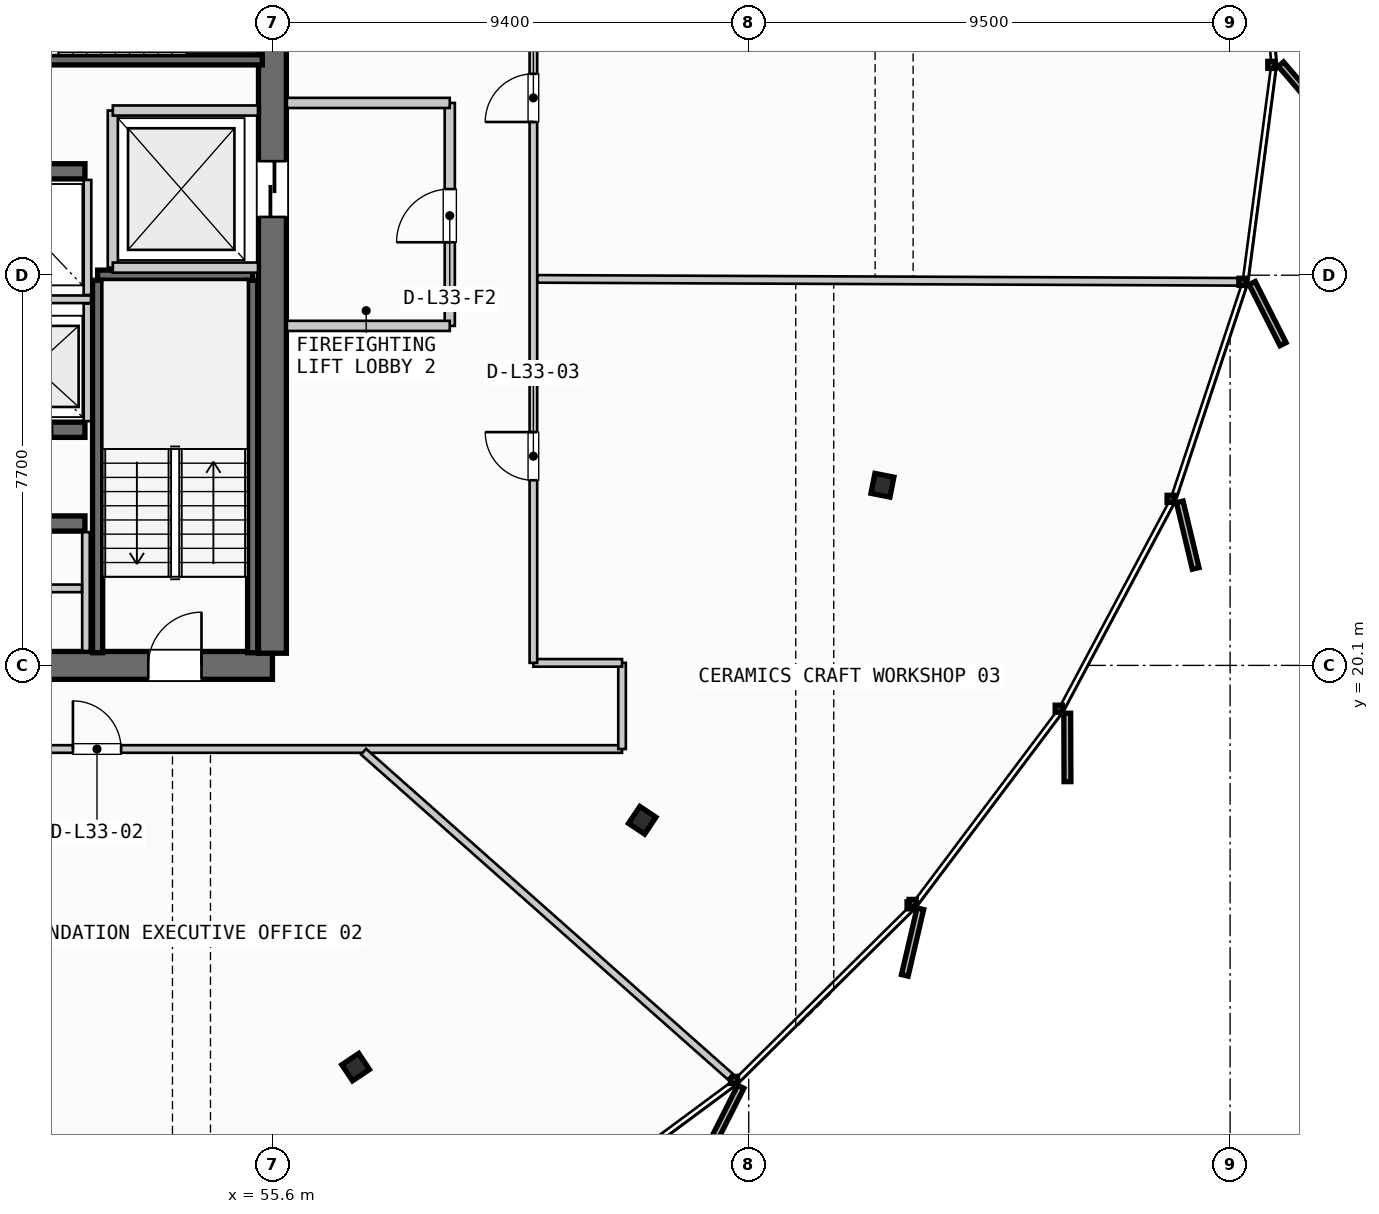
"""IFC4 building model, lengths in metres.
Left out: names, types, materials, properties, quantities, classifications, styles, units other than length and angle.
Written with IfcOpenShell. Run it as: python <this file> out.ifc"""

import sys

from ifc_helpers import new_model, si_unit, direction, frame, frame_2d, origin, origin_2d, place, context, subcontext, project, spatial, rectangle, i_section, extrude, source, transform, mapped, element, fill, save


model = new_model("IFC4")
c1 = context("Model", 3, precision=1e-05, world=origin(), true_north=direction((0.0, 1.0)))
c2 = subcontext(c1, "Body", "Model", "MODEL_VIEW")
j1 = project(units=[si_unit("LENGTHUNIT", "METRE"), si_unit("PLANEANGLEUNIT", "RADIAN")], contexts=[c1])
p1 = place(None, origin())
s1 = spatial("IfcSite", under=j1, at=p1, CompositionType="ELEMENT")
p2 = place(p1, origin())
s2 = spatial("IfcBuilding", under=s1, at=p2, CompositionType="ELEMENT")
p3 = place(p2, frame((0.0, 0.0, 132.35)))
s3 = spatial("IfcBuildingStorey", under=s2, at=p3, CompositionType="ELEMENT", Elevation=132.35)
p4 = place(p3, frame((38.0, 20.1, 0.0), z_axis=(0.0, 0.0, 1.0), x_axis=(1.0, 0.0, 0.0)))
e1 = element("IfcWall", 1, at=p4, inside=s3, PredefinedType="SHEAR", context=c2, shape_type="SweptSolid", body=[
    extrude(rectangle(XDim=17.6, YDim=0.55, at=frame_2d((8.8, 0.0))), origin(), (0.0, 0.0, 1.0), 3.3),
])
p5 = place(p4, frame((1.4, 0.0, 0.0)))
e2 = element("IfcOpeningElement", 2, at=p5, cuts=e1, PredefinedType="OPENING", context=c2, shape_type="SweptSolid", body=[
    extrude(rectangle(XDim=1.05, YDim=2.15, at=frame_2d((0.525, 1.075))), frame((0.0, 0.285, 0.0), z_axis=(0.0, -1.0, 0.0), x_axis=(1.0, 0.0, 0.0)), (0.0, 0.0, 1.0), 0.57),
])
p6 = place(p4, frame((15.15, 0.0, 0.0)))
e3 = element("IfcOpeningElement", 3, at=p6, cuts=e1, PredefinedType="OPENING", context=c2, shape_type="SweptSolid", body=[
    extrude(rectangle(XDim=1.05, YDim=2.15, at=frame_2d((0.525, 1.075))), frame((0.0, 0.285, 0.0), z_axis=(0.0, -1.0, 0.0), x_axis=(1.0, 0.0, 0.0)), (0.0, 0.0, 1.0), 0.57),
])
p7 = place(p4, frame((5.25, 0.0, 0.0)))
e4 = element("IfcOpeningElement", 4, at=p7, cuts=e1, PredefinedType="OPENING", context=c2, shape_type="SweptSolid", body=[
    extrude(rectangle(XDim=0.9, YDim=2.15, at=frame_2d((0.45, 1.075))), frame((0.0, 0.285, 0.0), z_axis=(0.0, -1.0, 0.0), x_axis=(1.0, 0.0, 0.0)), (0.0, 0.0, 1.0), 0.57),
])
p8 = place(p4, frame((11.4, 0.0, 0.0)))
e5 = element("IfcOpeningElement", 5, at=p8, cuts=e1, PredefinedType="OPENING", context=c2, shape_type="SweptSolid", body=[
    extrude(rectangle(XDim=0.95, YDim=2.15, at=frame_2d((0.475, 1.075))), frame((0.0, 0.285, 0.0), z_axis=(0.0, -1.0, 0.0), x_axis=(1.0, 0.0, 0.0)), (0.0, 0.0, 1.0), 0.57),
])
p9 = place(p3, frame((55.6, 20.34, 0.0), z_axis=(0.0, 0.0, 1.0), x_axis=(0.0, 1.0, 0.0)))
e6 = element("IfcWall", 6, at=p9, inside=s3, PredefinedType="SHEAR", context=c2, shape_type="SweptSolid", body=[
    extrude(rectangle(XDim=14.92, YDim=0.55, at=frame_2d((7.46, 0.0))), origin(), (0.0, 0.0, 1.0), 3.3),
])
p10 = place(p9, frame((12.71, 0.0, 0.0)))
e7 = element("IfcOpeningElement", 7, at=p10, cuts=e6, PredefinedType="OPENING", context=c2, shape_type="SweptSolid", body=[
    extrude(rectangle(XDim=1.05, YDim=2.15, at=frame_2d((0.525, 1.075))), frame((0.0, 0.285, 0.0), z_axis=(0.0, -1.0, 0.0), x_axis=(1.0, 0.0, 0.0)), (0.0, 0.0, 1.0), 0.57),
])
p11 = place(p9, frame((8.61, 0.0, 0.0)))
e8 = element("IfcOpeningElement", 8, at=p11, cuts=e6, PredefinedType="OPENING", context=c2, shape_type="SweptSolid", body=[
    extrude(rectangle(XDim=1.1, YDim=2.2, at=frame_2d((0.55, 1.1))), frame((0.0, 0.285, 0.0), z_axis=(0.0, -1.0, 0.0), x_axis=(1.0, 0.0, 0.0)), (0.0, 0.0, 1.0), 0.57),
])
p12 = place(p3, frame((47.65, 22.9, 0.0), z_axis=(0.0, 0.0, 1.0), x_axis=(1.0, 0.0, 0.0)))
e9 = element("IfcWall", 9, at=p12, inside=s3, PredefinedType="SHEAR", context=c2, shape_type="SweptSolid", body=[
    extrude(rectangle(XDim=4.25, YDim=0.3, at=frame_2d((2.125, 0.0))), origin(), (0.0, 0.0, 1.0), 3.3),
])
p13 = place(p3, frame((47.65, 24.75, 0.0), z_axis=(0.0, 0.0, 1.0), x_axis=(1.0, 0.0, 0.0)))
e10 = element("IfcWall", 10, at=p13, inside=s3, PredefinedType="SHEAR", context=c2, shape_type="SweptSolid", body=[
    extrude(rectangle(XDim=4.25, YDim=0.3, at=frame_2d((2.125, 0.0))), origin(), (0.0, 0.0, 1.0), 3.3),
])
p14 = place(p13, frame((0.45, 0.0, 0.0)))
e11 = element("IfcOpeningElement", 11, at=p14, cuts=e10, PredefinedType="OPENING", context=c2, shape_type="SweptSolid", body=[
    extrude(rectangle(XDim=1.1, YDim=2.2, at=frame_2d((0.55, 1.1))), frame((0.0, 0.16, 0.0), z_axis=(0.0, -1.0, 0.0), x_axis=(1.0, 0.0, 0.0)), (0.0, 0.0, 1.0), 0.32),
])
p15 = place(p13, frame((2.5, 0.0, 0.0)))
e12 = element("IfcOpeningElement", 12, at=p15, cuts=e10, PredefinedType="OPENING", context=c2, shape_type="SweptSolid", body=[
    extrude(rectangle(XDim=1.1, YDim=2.2, at=frame_2d((0.55, 1.1))), frame((0.0, 0.16, 0.0), z_axis=(0.0, -1.0, 0.0), x_axis=(1.0, 0.0, 0.0)), (0.0, 0.0, 1.0), 0.32),
])
p16 = place(p3, frame((47.65, 29.85, 0.0), z_axis=(0.0, 0.0, 1.0), x_axis=(1.0, 0.0, 0.0)))
e13 = element("IfcWall", 13, at=p16, inside=s3, PredefinedType="SHEAR", context=c2, shape_type="SweptSolid", body=[
    extrude(rectangle(XDim=4.25, YDim=0.3, at=frame_2d((2.125, 0.0))), origin(), (0.0, 0.0, 1.0), 3.3),
])
m1 = source(origin(), c2, "Body", "SweptSolid", [
    extrude(i_section(OverallWidth=0.401, OverallDepth=0.381, WebThickness=0.032, FlangeThickness=0.051, FilletRadius=0.015, at=origin_2d()), origin(), (0.0, 0.0, 1.0), 3.3),
])
for number, where, z_axis, x_axis in (
    (14, (57.242, 12.172, 0.0), (0.0, 0.0, 1.0), (0.556, -0.831, 0.0)),
    (15, (62.899, 17.043, 0.0), (0.0, 0.0, 1.0), (0.831, -0.556, 0.0)),
    (16, (67.639, 23.655, 0.0), (0.0, 0.0, 1.0), (0.981, -0.195, 0.0)),
):
    element("IfcColumn", number, at=place(p3, frame(where, z_axis=z_axis, x_axis=x_axis)), inside=s3, PredefinedType="COLUMN", context=c2, shape_type="MappedRepresentation", body=[
        mapped(m1, transform((0.0, 0.0, 0.0), scale=1.0)),
    ])
p17 = place(p3, frame((52.15, 27.8, 0.0), z_axis=(0.0, 0.0, 1.0), x_axis=(1.0, 0.0, 0.0)))
e17 = element("IfcWall", 17, at=p17, inside=s3, PredefinedType="SHEAR", context=c2, shape_type="SweptSolid", body=[
    extrude(rectangle(XDim=3.06, YDim=0.2, at=frame_2d((1.53, 0.0))), origin(), (0.0, 0.0, 1.0), 3.3),
])
for number, where, z_axis, x_axis in (
    (18, (55.21, 27.7, 0.0), (0.0, 0.0, 1.0), (0.0, -1.0, 0.0)),
    (19, (52.15, 20.35, 0.0), (0.0, 0.0, 1.0), (0.0, 1.0, 0.0)),
    (20, (55.4, 32.05, 0.0), (0.0, 0.0, 1.0), (-1.0, 0.0, 0.0)),
):
    element("IfcWall", number, at=place(p3, frame(where, z_axis=z_axis, x_axis=x_axis)), inside=s3, PredefinedType="SHEAR", context=c2, shape_type="SweptSolid", body=[
        extrude(rectangle(XDim=7.35, YDim=0.2, at=frame_2d((3.675, 0.0))), origin(), (0.0, 0.0, 1.0), 3.3),
    ])
p18 = place(p3, frame((52.45, 27.95, 0.0), z_axis=(0.0, 0.0, 1.0), x_axis=(0.0, 1.0, 0.0)))
e21 = element("IfcWall", 21, at=p18, inside=s3, PredefinedType="PARTITIONING", context=c2, shape_type="SweptSolid", body=[
    extrude(rectangle(XDim=3.1, YDim=0.2, at=frame_2d((1.55, 0.0))), origin(), (0.0, 0.0, 1.0), 2.445),
])
for number, where, z_axis, x_axis in (
    (22, (52.45, 27.95, 0.0), (0.0, 0.0, 1.0), (1.0, 0.0, 0.0)),
    (23, (52.45, 31.05, 0.0), (0.0, 0.0, 1.0), (1.0, 0.0, 0.0)),
):
    element("IfcWall", number, at=place(p3, frame(where, z_axis=z_axis, x_axis=x_axis)), inside=s3, PredefinedType="PARTITIONING", context=c2, shape_type="SweptSolid", body=[
        extrude(rectangle(XDim=2.865, YDim=0.2, at=frame_2d((1.433, 0.0))), origin(), (0.0, 0.0, 1.0), 2.445),
    ])
p19 = place(p3, frame((59.1, 26.8, 0.0), z_axis=(0.0, 0.0, 1.0), x_axis=(0.0, 1.0, 0.0)))
e24 = element("IfcWall", 24, at=p19, inside=s3, PredefinedType="PARTITIONING", context=c2, shape_type="SweptSolid", body=[
    extrude(rectangle(XDim=4.4, YDim=0.2, at=frame_2d((2.2, 0.0))), origin(), (0.0, 0.0, 1.0), 2.445),
])
p20 = place(p19, frame((1.65, 0.0, 0.0)))
e25 = element("IfcOpeningElement", 25, at=p20, cuts=e24, PredefinedType="OPENING", context=c2, shape_type="SweptSolid", body=[
    extrude(rectangle(XDim=1.05, YDim=2.15, at=frame_2d((0.525, 1.075))), frame((0.0, 0.11, 0.0), z_axis=(0.0, -1.0, 0.0), x_axis=(1.0, 0.0, 0.0)), (0.0, 0.0, 1.0), 0.22),
])
for number, where, z_axis, x_axis in (
    (26, (55.885, 26.8, 0.0), (0.0, 0.0, 1.0), (1.0, 0.0, 0.0)),
    (27, (55.885, 31.2, 0.0), (0.0, 0.0, 1.0), (1.0, 0.0, 0.0)),
):
    element("IfcWall", number, at=place(p3, frame(where, z_axis=z_axis, x_axis=x_axis)), inside=s3, PredefinedType="PARTITIONING", context=c2, shape_type="SweptSolid", body=[
        extrude(rectangle(XDim=3.215, YDim=0.2, at=frame_2d((1.607, 0.0))), origin(), (0.0, 0.0, 1.0), 2.445),
    ])
p21 = place(p3, frame((51.92, 20.385, 0.0), z_axis=(0.0, 0.0, 1.0), x_axis=(0.0, 1.0, 0.0)))
e28 = element("IfcWall", 28, at=p21, inside=s3, PredefinedType="PARTITIONING", context=c2, shape_type="SweptSolid", body=[
    extrude(rectangle(XDim=2.345, YDim=0.15, at=frame_2d((1.172, 0.0))), origin(), (0.0, 0.0, 1.0), 2.445),
])
p22 = place(p3, frame((47.88, 21.62, 0.0), z_axis=(0.0, 0.0, 1.0), x_axis=(1.0, 0.0, 0.0)))
e29 = element("IfcWall", 29, at=p22, inside=s3, PredefinedType="PARTITIONING", context=c2, shape_type="SweptSolid", body=[
    extrude(rectangle(XDim=3.96, YDim=0.15, at=frame_2d((1.98, 0.0))), origin(), (0.0, 0.0, 1.0), 2.445),
])
p23 = place(p22, frame((1.55, 0.0, 0.0)))
e30 = element("IfcOpeningElement", 30, at=p23, cuts=e29, PredefinedType="OPENING", context=c2, shape_type="SweptSolid", body=[
    extrude(rectangle(XDim=0.85, YDim=2.15, at=frame_2d((0.425, 1.075))), frame((0.0, 0.085, 0.0), z_axis=(0.0, -1.0, 0.0), x_axis=(1.0, 0.0, 0.0)), (0.0, 0.0, 1.0), 0.17),
])
p24 = place(p3, frame((47.7, 27.325, 0.0), z_axis=(0.0, 0.0, 1.0), x_axis=(1.0, 0.0, 0.0)))
e31 = element("IfcWall", 31, at=p24, inside=s3, PredefinedType="PARTITIONING", context=c2, shape_type="SweptSolid", body=[
    extrude(rectangle(XDim=4.32, YDim=0.15, at=frame_2d((2.16, 0.0))), origin(), (0.0, 0.0, 1.0), 2.445),
])
p25 = place(p3, frame((51.95, 24.92, 0.0), z_axis=(0.0, 0.0, 1.0), x_axis=(0.0, 1.0, 0.0)))
e32 = element("IfcWall", 32, at=p25, inside=s3, PredefinedType="PARTITIONING", context=c2, shape_type="SweptSolid", body=[
    extrude(rectangle(XDim=2.32, YDim=0.15, at=frame_2d((1.16, 0.0))), origin(), (0.0, 0.0, 1.0), 2.445),
])
p26 = place(p3, frame((51.95, 27.41, 0.0), z_axis=(0.0, 0.0, 1.0), x_axis=(0.0, 1.0, 0.0)))
e33 = element("IfcWall", 33, at=p26, inside=s3, PredefinedType="PARTITIONING", context=c2, shape_type="SweptSolid", body=[
    extrude(rectangle(XDim=2.27, YDim=0.15, at=frame_2d((1.135, 0.0))), origin(), (0.0, 0.0, 1.0), 2.445),
])
p27 = place(p3, frame((31.1, 18.45, 0.0), z_axis=(0.0, 0.0, 1.0), x_axis=(1.0, 0.0, 0.0)))
e34 = element("IfcWall", 34, at=p27, inside=s3, PredefinedType="PARTITIONING", context=c2, shape_type="SweptSolid", body=[
    extrude(rectangle(XDim=31.4, YDim=0.15, at=frame_2d((15.7, 0.0))), origin(), (0.0, 0.0, 1.0), 2.445),
])
p28 = place(p27, frame((9.754, 0.0, 0.0)))
e35 = element("IfcOpeningElement", 35, at=p28, cuts=e34, PredefinedType="OPENING", context=c2, shape_type="SweptSolid", body=[
    extrude(rectangle(XDim=0.95, YDim=2.15, at=frame_2d((0.475, 1.075))), frame((0.0, 0.085, 0.0), z_axis=(0.0, -1.0, 0.0), x_axis=(1.0, 0.0, 0.0)), (0.0, 0.0, 1.0), 0.17),
])
p29 = place(p27, frame((20.563, 0.0, 0.0)))
e36 = element("IfcOpeningElement", 36, at=p29, cuts=e34, PredefinedType="OPENING", context=c2, shape_type="SweptSolid", body=[
    extrude(rectangle(XDim=0.95, YDim=2.15, at=frame_2d((0.475, 1.075))), frame((0.0, 0.085, 0.0), z_axis=(0.0, -1.0, 0.0), x_axis=(1.0, 0.0, 0.0)), (0.0, 0.0, 1.0), 0.17),
])
p30 = place(p3, frame((62.5, 18.45, 0.0), z_axis=(0.0, 0.0, 1.0), x_axis=(0.0, 1.0, 0.0)))
e37 = element("IfcWall", 37, at=p30, inside=s3, PredefinedType="PARTITIONING", context=c2, shape_type="SweptSolid", body=[
    extrude(rectangle(XDim=1.7, YDim=0.15, at=frame_2d((0.85, 0.0))), origin(), (0.0, 0.0, 1.0), 2.445),
])
p31 = place(p3, frame((62.5, 20.15, 0.0), z_axis=(0.0, 0.0, 1.0), x_axis=(-1.0, 0.0, 0.0)))
e38 = element("IfcWall", 38, at=p31, inside=s3, PredefinedType="PARTITIONING", context=c2, shape_type="SweptSolid", body=[
    extrude(rectangle(XDim=1.75, YDim=0.15, at=frame_2d((0.875, 0.0))), origin(), (0.0, 0.0, 1.0), 2.445),
])
p32 = place(p3, frame((60.75, 20.15, 0.0), z_axis=(0.0, 0.0, 1.0), x_axis=(0.0, 1.0, 0.0)))
e39 = element("IfcWall", 39, at=p32, inside=s3, PredefinedType="PARTITIONING", context=c2, shape_type="SweptSolid", body=[
    extrude(rectangle(XDim=15.3, YDim=0.15, at=frame_2d((7.65, 0.0))), origin(), (0.0, 0.0, 1.0), 2.445),
])
p33 = place(p32, frame((3.604, 0.0, 0.0)))
e40 = element("IfcOpeningElement", 40, at=p33, cuts=e39, PredefinedType="OPENING", context=c2, shape_type="SweptSolid", body=[
    extrude(rectangle(XDim=0.95, YDim=2.15, at=frame_2d((0.475, 1.075))), frame((0.0, 0.085, 0.0), z_axis=(0.0, -1.0, 0.0), x_axis=(1.0, 0.0, 0.0)), (0.0, 0.0, 1.0), 0.17),
])
p34 = place(p32, frame((10.674, 0.0, 0.0)))
e41 = element("IfcOpeningElement", 41, at=p34, cuts=e39, PredefinedType="OPENING", context=c2, shape_type="SweptSolid", body=[
    extrude(rectangle(XDim=0.95, YDim=2.15, at=frame_2d((0.475, 1.075))), frame((0.0, 0.085, 0.0), z_axis=(0.0, -1.0, 0.0), x_axis=(1.0, 0.0, 0.0)), (0.0, 0.0, 1.0), 0.17),
])
p35 = place(p3, frame((57.398, 18.397, 0.0), z_axis=(0.0, 0.0, 1.0), x_axis=(0.748504738048, -0.663129442206, 0.0)))
e42 = element("IfcWall", 42, at=p35, inside=s3, PredefinedType="PARTITIONING", context=c2, shape_type="SweptSolid", body=[
    extrude(rectangle(XDim=9.668, YDim=0.15, at=frame_2d((4.834, 0.0))), origin(), (0.0, 0.0, 1.0), 2.445),
])
p36 = place(p3, frame((60.83, 27.728, 0.0), z_axis=(0.0, 0.0, 1.0), x_axis=(0.999991231603, -0.004187686361, 0.0)))
e43 = element("IfcWall", 43, at=p36, inside=s3, PredefinedType="PARTITIONING", context=c2, shape_type="SweptSolid", body=[
    extrude(rectangle(XDim=13.817, YDim=0.15, at=frame_2d((6.908, 0.0))), origin(), (0.0, 0.0, 1.0), 2.445),
])
m2 = source(origin(), c2, "Body", "SweptSolid", [
    extrude(rectangle(XDim=1.05, YDim=2.15, at=frame_2d((0.525, 1.075))), frame((0.0, 0.025, 0.0), z_axis=(0.0, -1.0, 0.0), x_axis=(1.0, 0.0, 0.0)), (0.0, 0.0, 1.0), 0.05),
])
p37 = place(p6, origin())
e44 = element("IfcDoor", 44, at=p37, inside=s3, OperationType="SINGLE_SWING_RIGHT", PredefinedType="DOOR", context=c2, shape_type="MappedRepresentation", body=[
    mapped(m2, transform((0.0, 0.0, 0.0), scale=1.0)),
])
fill(e3, e44)
m3 = source(origin(), c2, "Body", "SweptSolid", [
    extrude(rectangle(XDim=1.1, YDim=2.2, at=frame_2d((0.55, 1.1))), frame((0.0, 0.025, 0.0), z_axis=(0.0, -1.0, 0.0), x_axis=(1.0, 0.0, 0.0)), (0.0, 0.0, 1.0), 0.05),
])
p38 = place(p11, origin())
e45 = element("IfcDoor", 45, at=p38, inside=s3, OperationType="SLIDING_TO_RIGHT", PredefinedType="DOOR", context=c2, shape_type="MappedRepresentation", body=[
    mapped(m3, transform((0.0, 0.0, 0.0), scale=1.0)),
])
fill(e8, e45)
p39 = place(p20, origin())
e46 = element("IfcDoor", 46, at=p39, inside=s3, OperationType="SINGLE_SWING_LEFT", PredefinedType="DOOR", context=c2, shape_type="MappedRepresentation", body=[
    mapped(m2, transform((0.0, 0.0, 0.0), scale=1.0)),
])
fill(e25, e46)
m4 = source(origin(), c2, "Body", "SweptSolid", [
    extrude(rectangle(XDim=0.95, YDim=2.15, at=frame_2d((0.475, 1.075))), frame((0.0, 0.025, 0.0), z_axis=(0.0, -1.0, 0.0), x_axis=(1.0, 0.0, 0.0)), (0.0, 0.0, 1.0), 0.05),
])
p40 = place(p29, origin())
e47 = element("IfcDoor", 47, at=p40, inside=s3, OperationType="SINGLE_SWING_LEFT", PredefinedType="DOOR", context=c2, shape_type="MappedRepresentation", body=[
    mapped(m4, transform((0.0, 0.0, 0.0), scale=1.0)),
])
fill(e36, e47)
p41 = place(p33, origin())
e48 = element("IfcDoor", 48, at=p41, inside=s3, OperationType="SINGLE_SWING_RIGHT", PredefinedType="DOOR", context=c2, shape_type="MappedRepresentation", body=[
    mapped(m4, transform((0.0, 0.0, 0.0), scale=1.0)),
])
fill(e40, e48)
p42 = place(p34, origin())
e49 = element("IfcDoor", 49, at=p42, inside=s3, OperationType="SINGLE_SWING_LEFT", PredefinedType="DOOR", context=c2, shape_type="MappedRepresentation", body=[
    mapped(m4, transform((0.0, 0.0, 0.0), scale=1.0)),
])
fill(e41, e49)
save(model, sys.argv[1])
